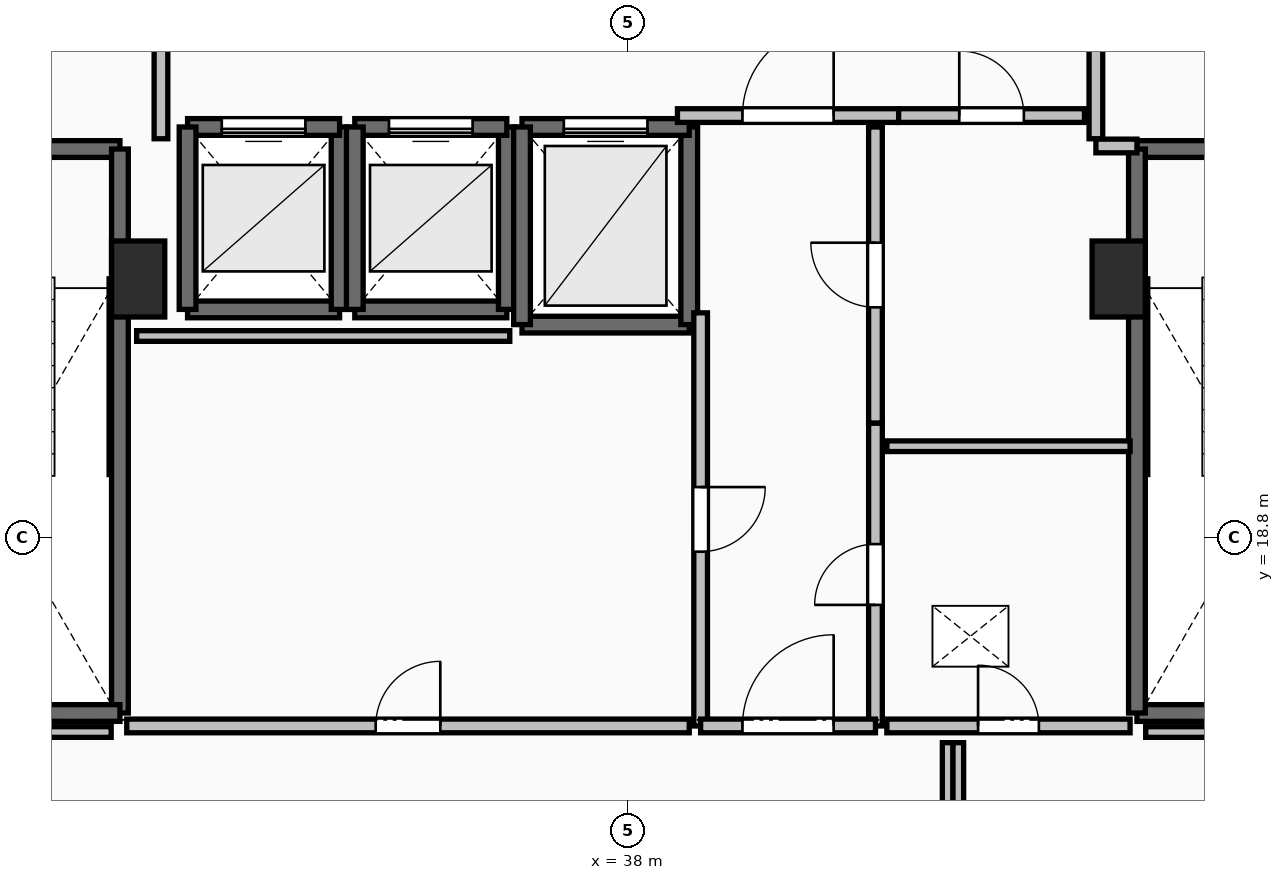
"""IFC4 building model, lengths in metres.
Left out: names, types, materials, properties, quantities, classifications, styles, units other than length and angle.
Written with IfcOpenShell. Run it as: python <this file> out.ifc"""

import sys

from ifc_helpers import new_model, si_unit, direction, frame, frame_2d, origin, origin_2d, place, context, subcontext, project, spatial, rectangle, extrude, element, fill, save


model = new_model("IFC4")
c1 = context("Model", 3, precision=1e-05, world=origin(), true_north=direction((0.0, 1.0)))
c2 = subcontext(c1, "Body", "Model", "MODEL_VIEW")
j1 = project(units=[si_unit("LENGTHUNIT", "METRE"), si_unit("PLANEANGLEUNIT", "RADIAN")], contexts=[c1])
p1 = place(None, origin())
s1 = spatial("IfcSite", under=j1, at=p1, CompositionType="ELEMENT")
p2 = place(p1, origin())
s2 = spatial("IfcBuilding", under=s1, at=p2, CompositionType="ELEMENT")
p3 = place(p2, frame((0.0, 0.0, 179.1)))
s3 = spatial("IfcBuildingStorey", under=s2, at=p3, CompositionType="ELEMENT", Elevation=179.1)
for number, where, z_axis, x_axis in (
    (1, (31.55, 22.2, 0.0), (0.0, 0.0, 1.0), (1.0, 0.0, 0.0)),
    (2, (44.45, 22.2, 0.0), (0.0, 0.0, 1.0), (1.0, 0.0, 0.0)),
):
    element("IfcColumn", number, at=place(p3, frame(where, z_axis=z_axis, x_axis=x_axis)), inside=s3, PredefinedType="PILASTER", context=c2, shape_type="SweptSolid", body=[
        extrude(rectangle(XDim=0.7, YDim=1.0, at=origin_2d()), origin(), (0.0, 0.0, 1.0), 3.5),
    ])
p4 = place(p3, frame((27.94, 23.91, 0.0), z_axis=(0.0, 0.0, 1.0), x_axis=(1.0, 0.0, 0.0)))
e3 = element("IfcWall", 3, at=p4, inside=s3, PredefinedType="SOLIDWALL", context=c2, shape_type="SweptSolid", body=[
    extrude(rectangle(XDim=3.37, YDim=0.22, at=frame_2d((1.685, 0.0))), origin(), (0.0, 0.0, 1.0), 3.24),
])
p5 = place(p4, frame((1.135, 0.0, 0.0)))
e4 = element("IfcOpeningElement", 4, at=p5, cuts=e3, PredefinedType="OPENING", context=c2, shape_type="SweptSolid", body=[
    extrude(rectangle(XDim=1.1, YDim=2.15, at=frame_2d((0.55, 1.075))), frame((0.0, 0.125, 0.0), z_axis=(0.0, -1.0, 0.0), x_axis=(1.0, 0.0, 0.0)), (0.0, 0.0, 1.0), 0.25),
])
p6 = place(p3, frame((31.31, 23.91, 0.0), z_axis=(0.0, 0.0, 1.0), x_axis=(0.0, -1.0, 0.0)))
e5 = element("IfcWall", 5, at=p6, inside=s3, PredefinedType="SOLIDWALL", context=c2, shape_type="SweptSolid", body=[
    extrude(rectangle(XDim=7.42, YDim=0.22, at=frame_2d((3.71, 0.0))), origin(), (0.0, 0.0, 1.0), 3.24),
])
p7 = place(p3, frame((31.31, 16.49, 0.0), z_axis=(0.0, 0.0, 1.0), x_axis=(-1.0, 0.0, 0.0)))
e6 = element("IfcWall", 6, at=p7, inside=s3, PredefinedType="SOLIDWALL", context=c2, shape_type="SweptSolid", body=[
    extrude(rectangle(XDim=3.37, YDim=0.22, at=frame_2d((1.685, 0.0))), origin(), (0.0, 0.0, 1.0), 3.24),
])
p8 = place(p3, frame((44.69, 23.91, 0.0), z_axis=(0.0, 0.0, 1.0), x_axis=(1.0, 0.0, 0.0)))
e7 = element("IfcWall", 7, at=p8, inside=s3, PredefinedType="SOLIDWALL", context=c2, shape_type="SweptSolid", body=[
    extrude(rectangle(XDim=3.37, YDim=0.22, at=frame_2d((1.685, 0.0))), origin(), (0.0, 0.0, 1.0), 3.24),
])
p9 = place(p8, frame((1.135, 0.0, 0.0)))
e8 = element("IfcOpeningElement", 8, at=p9, cuts=e7, PredefinedType="OPENING", context=c2, shape_type="SweptSolid", body=[
    extrude(rectangle(XDim=1.1, YDim=2.15, at=frame_2d((0.55, 1.075))), frame((0.0, 0.125, 0.0), z_axis=(0.0, -1.0, 0.0), x_axis=(1.0, 0.0, 0.0)), (0.0, 0.0, 1.0), 0.25),
])
p10 = place(p3, frame((48.06, 16.49, 0.0), z_axis=(0.0, 0.0, 1.0), x_axis=(-1.0, 0.0, 0.0)))
e9 = element("IfcWall", 9, at=p10, inside=s3, PredefinedType="SOLIDWALL", context=c2, shape_type="SweptSolid", body=[
    extrude(rectangle(XDim=3.37, YDim=0.22, at=frame_2d((1.685, 0.0))), origin(), (0.0, 0.0, 1.0), 3.24),
])
p11 = place(p3, frame((44.69, 16.49, 0.0), z_axis=(0.0, 0.0, 1.0), x_axis=(0.0, 1.0, 0.0)))
e10 = element("IfcWall", 10, at=p11, inside=s3, PredefinedType="SOLIDWALL", context=c2, shape_type="SweptSolid", body=[
    extrude(rectangle(XDim=7.42, YDim=0.22, at=frame_2d((3.71, 0.0))), origin(), (0.0, 0.0, 1.0), 3.24),
])
p12 = place(p3, frame((32.2, 21.8, 0.0), z_axis=(0.0, 0.0, 1.0), x_axis=(1.0, 0.0, 0.0)))
e11 = element("IfcWall", 11, at=p12, inside=s3, PredefinedType="SOLIDWALL", context=c2, shape_type="SweptSolid", body=[
    extrude(rectangle(XDim=2.0, YDim=0.22, at=frame_2d((1.0, 0.0))), origin(), (0.0, 0.0, 1.0), 3.24),
])
p13 = place(p3, frame((34.2, 21.8, 0.0), z_axis=(0.0, 0.0, 1.0), x_axis=(0.0, 1.0, 0.0)))
e12 = element("IfcWall", 12, at=p13, inside=s3, PredefinedType="SOLIDWALL", context=c2, shape_type="SweptSolid", body=[
    extrude(rectangle(XDim=2.4, YDim=0.22, at=frame_2d((1.2, 0.0))), origin(), (0.0, 0.0, 1.0), 3.24),
])
p14 = place(p3, frame((34.2, 24.2, 0.0), z_axis=(0.0, 0.0, 1.0), x_axis=(-1.0, 0.0, 0.0)))
e13 = element("IfcWall", 13, at=p14, inside=s3, PredefinedType="SOLIDWALL", context=c2, shape_type="SweptSolid", body=[
    extrude(rectangle(XDim=2.0, YDim=0.22, at=frame_2d((1.0, 0.0))), origin(), (0.0, 0.0, 1.0), 3.24),
])
p15 = place(p14, frame((0.45, 0.0, 0.0)))
e14 = element("IfcOpeningElement", 14, at=p15, cuts=e13, PredefinedType="OPENING", context=c2, shape_type="SweptSolid", body=[
    extrude(rectangle(XDim=1.1, YDim=2.2, at=frame_2d((0.55, 1.1))), frame((0.0, 0.125, 0.0), z_axis=(0.0, -1.0, 0.0), x_axis=(1.0, 0.0, 0.0)), (0.0, 0.0, 1.0), 0.25),
])
p16 = place(p3, frame((32.2, 24.2, 0.0), z_axis=(0.0, 0.0, 1.0), x_axis=(0.0, -1.0, 0.0)))
e15 = element("IfcWall", 15, at=p16, inside=s3, PredefinedType="SOLIDWALL", context=c2, shape_type="SweptSolid", body=[
    extrude(rectangle(XDim=2.4, YDim=0.22, at=frame_2d((1.2, 0.0))), origin(), (0.0, 0.0, 1.0), 3.24),
])
p17 = place(p3, frame((34.4, 21.8, 0.0), z_axis=(0.0, 0.0, 1.0), x_axis=(1.0, 0.0, 0.0)))
e16 = element("IfcWall", 16, at=p17, inside=s3, PredefinedType="SOLIDWALL", context=c2, shape_type="SweptSolid", body=[
    extrude(rectangle(XDim=2.0, YDim=0.22, at=frame_2d((1.0, 0.0))), origin(), (0.0, 0.0, 1.0), 3.24),
])
p18 = place(p3, frame((36.4, 21.8, 0.0), z_axis=(0.0, 0.0, 1.0), x_axis=(0.0, 1.0, 0.0)))
e17 = element("IfcWall", 17, at=p18, inside=s3, PredefinedType="SOLIDWALL", context=c2, shape_type="SweptSolid", body=[
    extrude(rectangle(XDim=2.4, YDim=0.22, at=frame_2d((1.2, 0.0))), origin(), (0.0, 0.0, 1.0), 3.24),
])
p19 = place(p3, frame((36.4, 24.2, 0.0), z_axis=(0.0, 0.0, 1.0), x_axis=(-1.0, 0.0, 0.0)))
e18 = element("IfcWall", 18, at=p19, inside=s3, PredefinedType="SOLIDWALL", context=c2, shape_type="SweptSolid", body=[
    extrude(rectangle(XDim=2.0, YDim=0.22, at=frame_2d((1.0, 0.0))), origin(), (0.0, 0.0, 1.0), 3.24),
])
p20 = place(p19, frame((0.45, 0.0, 0.0)))
e19 = element("IfcOpeningElement", 19, at=p20, cuts=e18, PredefinedType="OPENING", context=c2, shape_type="SweptSolid", body=[
    extrude(rectangle(XDim=1.1, YDim=2.2, at=frame_2d((0.55, 1.1))), frame((0.0, 0.125, 0.0), z_axis=(0.0, -1.0, 0.0), x_axis=(1.0, 0.0, 0.0)), (0.0, 0.0, 1.0), 0.25),
])
p21 = place(p3, frame((34.4, 24.2, 0.0), z_axis=(0.0, 0.0, 1.0), x_axis=(0.0, -1.0, 0.0)))
e20 = element("IfcWall", 20, at=p21, inside=s3, PredefinedType="SOLIDWALL", context=c2, shape_type="SweptSolid", body=[
    extrude(rectangle(XDim=2.4, YDim=0.22, at=frame_2d((1.2, 0.0))), origin(), (0.0, 0.0, 1.0), 3.24),
])
p22 = place(p3, frame((36.6, 21.6, 0.0), z_axis=(0.0, 0.0, 1.0), x_axis=(1.0, 0.0, 0.0)))
e21 = element("IfcWall", 21, at=p22, inside=s3, PredefinedType="SOLIDWALL", context=c2, shape_type="SweptSolid", body=[
    extrude(rectangle(XDim=2.2, YDim=0.22, at=frame_2d((1.1, 0.0))), origin(), (0.0, 0.0, 1.0), 3.24),
])
p23 = place(p3, frame((38.8, 21.6, 0.0), z_axis=(0.0, 0.0, 1.0), x_axis=(0.0, 1.0, 0.0)))
e22 = element("IfcWall", 22, at=p23, inside=s3, PredefinedType="SOLIDWALL", context=c2, shape_type="SweptSolid", body=[
    extrude(rectangle(XDim=2.6, YDim=0.22, at=frame_2d((1.3, 0.0))), origin(), (0.0, 0.0, 1.0), 3.24),
])
p24 = place(p3, frame((38.8, 24.2, 0.0), z_axis=(0.0, 0.0, 1.0), x_axis=(-1.0, 0.0, 0.0)))
e23 = element("IfcWall", 23, at=p24, inside=s3, PredefinedType="SOLIDWALL", context=c2, shape_type="SweptSolid", body=[
    extrude(rectangle(XDim=2.2, YDim=0.22, at=frame_2d((1.1, 0.0))), origin(), (0.0, 0.0, 1.0), 3.24),
])
p25 = place(p24, frame((0.55, 0.0, 0.0)))
e24 = element("IfcOpeningElement", 24, at=p25, cuts=e23, PredefinedType="OPENING", context=c2, shape_type="SweptSolid", body=[
    extrude(rectangle(XDim=1.1, YDim=2.2, at=frame_2d((0.55, 1.1))), frame((0.0, 0.125, 0.0), z_axis=(0.0, -1.0, 0.0), x_axis=(1.0, 0.0, 0.0)), (0.0, 0.0, 1.0), 0.25),
])
p26 = place(p3, frame((36.6, 24.2, 0.0), z_axis=(0.0, 0.0, 1.0), x_axis=(0.0, -1.0, 0.0)))
e25 = element("IfcWall", 25, at=p26, inside=s3, PredefinedType="SOLIDWALL", context=c2, shape_type="SweptSolid", body=[
    extrude(rectangle(XDim=2.6, YDim=0.22, at=frame_2d((1.3, 0.0))), origin(), (0.0, 0.0, 1.0), 3.24),
])
p27 = place(p3, frame((31.85, 24.045, 0.0), z_axis=(0.0, 0.0, 1.0), x_axis=(0.0, 1.0, 0.0)))
e26 = element("IfcWall", 26, at=p27, inside=s3, PredefinedType="PARTITIONING", context=c2, shape_type="SweptSolid", body=[
    extrude(rectangle(XDim=3.91, YDim=0.18, at=frame_2d((1.955, 0.0))), origin(), (0.0, 0.0, 1.0), 3.24),
])
p28 = place(p27, frame((1.355, 0.0, 0.0)))
e27 = element("IfcOpeningElement", 27, at=p28, cuts=e26, PredefinedType="OPENING", context=c2, shape_type="SweptSolid", body=[
    extrude(rectangle(XDim=1.2, YDim=2.15, at=frame_2d((0.6, 1.075))), frame((0.0, 0.105, 0.0), z_axis=(0.0, -1.0, 0.0), x_axis=(1.0, 0.0, 0.0)), (0.0, 0.0, 1.0), 0.21),
])
p29 = place(p3, frame((44.15, 27.955, 0.0), z_axis=(0.0, 0.0, 1.0), x_axis=(0.0, -1.0, 0.0)))
e28 = element("IfcWall", 28, at=p29, inside=s3, PredefinedType="PARTITIONING", context=c2, shape_type="SweptSolid", body=[
    extrude(rectangle(XDim=3.91, YDim=0.18, at=frame_2d((1.955, 0.0))), origin(), (0.0, 0.0, 1.0), 3.24),
])
p30 = place(p29, frame((1.355, 0.0, 0.0)))
e29 = element("IfcOpeningElement", 29, at=p30, cuts=e28, PredefinedType="OPENING", context=c2, shape_type="SweptSolid", body=[
    extrude(rectangle(XDim=1.2, YDim=2.15, at=frame_2d((0.6, 1.075))), frame((0.0, 0.105, 0.0), z_axis=(0.0, -1.0, 0.0), x_axis=(1.0, 0.0, 0.0)), (0.0, 0.0, 1.0), 0.21),
])
p31 = place(p3, frame((44.15, 23.95, 0.0), z_axis=(0.0, 0.0, 1.0), x_axis=(1.0, 0.0, 0.0)))
e30 = element("IfcWall", 30, at=p31, inside=s3, PredefinedType="PARTITIONING", context=c2, shape_type="SweptSolid", body=[
    extrude(rectangle(XDim=0.54, YDim=0.18, at=frame_2d((0.27, 0.0))), origin(), (0.0, 0.0, 1.0), 3.24),
])
p32 = place(p3, frame((38.645, 24.35, 0.0), z_axis=(0.0, 0.0, 1.0), x_axis=(1.0, 0.0, 0.0)))
e31 = element("IfcWall", 31, at=p32, inside=s3, PredefinedType="PARTITIONING", context=c2, shape_type="SweptSolid", body=[
    extrude(rectangle(XDim=2.91, YDim=0.18, at=frame_2d((1.455, 0.0))), origin(), (0.0, 0.0, 1.0), 3.24),
])
p33 = place(p32, frame((0.855, 0.0, 0.0)))
e32 = element("IfcOpeningElement", 32, at=p33, cuts=e31, PredefinedType="OPENING", context=c2, shape_type="SweptSolid", body=[
    extrude(rectangle(XDim=1.2, YDim=2.15, at=frame_2d((0.6, 1.075))), frame((0.0, 0.105, 0.0), z_axis=(0.0, -1.0, 0.0), x_axis=(1.0, 0.0, 0.0)), (0.0, 0.0, 1.0), 0.21),
])
p34 = place(p3, frame((41.555, 24.35, 0.0), z_axis=(0.0, 0.0, 1.0), x_axis=(1.0, 0.0, 0.0)))
e33 = element("IfcWall", 33, at=p34, inside=s3, PredefinedType="PARTITIONING", context=c2, shape_type="SweptSolid", body=[
    extrude(rectangle(XDim=2.445, YDim=0.18, at=frame_2d((1.223, 0.0))), origin(), (0.0, 0.0, 1.0), 3.24),
])
p35 = place(p34, frame((0.798, 0.0, 0.0)))
e34 = element("IfcOpeningElement", 34, at=p35, cuts=e33, PredefinedType="OPENING", context=c2, shape_type="SweptSolid", body=[
    extrude(rectangle(XDim=0.85, YDim=2.1, at=frame_2d((0.425, 1.05))), frame((0.0, 0.105, 0.0), z_axis=(0.0, -1.0, 0.0), x_axis=(1.0, 0.0, 0.0)), (0.0, 0.0, 1.0), 0.21),
])
p36 = place(p3, frame((41.25, 16.32, 0.0), z_axis=(0.0, 0.0, 1.0), x_axis=(0.0, 1.0, 0.0)))
e35 = element("IfcWall", 35, at=p36, inside=s3, PredefinedType="PARTITIONING", context=c2, shape_type="SweptSolid", body=[
    extrude(rectangle(XDim=3.985, YDim=0.18, at=frame_2d((1.992, 0.0))), origin(), (0.0, 0.0, 1.0), 3.24),
])
p37 = place(p36, frame((1.593, 0.0, 0.0)))
e36 = element("IfcOpeningElement", 36, at=p37, cuts=e35, PredefinedType="OPENING", context=c2, shape_type="SweptSolid", body=[
    extrude(rectangle(XDim=0.8, YDim=2.05, at=frame_2d((0.4, 1.025))), frame((0.0, 0.105, 0.0), z_axis=(0.0, -1.0, 0.0), x_axis=(1.0, 0.0, 0.0)), (0.0, 0.0, 1.0), 0.21),
])
p38 = place(p3, frame((41.25, 20.305, 0.0), z_axis=(0.0, 0.0, 1.0), x_axis=(0.0, 1.0, 0.0)))
e37 = element("IfcWall", 37, at=p38, inside=s3, PredefinedType="PARTITIONING", context=c2, shape_type="SweptSolid", body=[
    extrude(rectangle(XDim=3.895, YDim=0.18, at=frame_2d((1.948, 0.0))), origin(), (0.0, 0.0, 1.0), 3.24),
])
p39 = place(p38, frame((1.522, 0.0, 0.0)))
e38 = element("IfcOpeningElement", 38, at=p39, cuts=e37, PredefinedType="OPENING", context=c2, shape_type="SweptSolid", body=[
    extrude(rectangle(XDim=0.85, YDim=2.1, at=frame_2d((0.425, 1.05))), frame((0.0, 0.105, 0.0), z_axis=(0.0, -1.0, 0.0), x_axis=(1.0, 0.0, 0.0)), (0.0, 0.0, 1.0), 0.21),
])
p40 = place(p3, frame((38.95, 21.755, 0.0), z_axis=(0.0, 0.0, 1.0), x_axis=(0.0, -1.0, 0.0)))
e39 = element("IfcWall", 39, at=p40, inside=s3, PredefinedType="PARTITIONING", context=c2, shape_type="SweptSolid", body=[
    extrude(rectangle(XDim=5.435, YDim=0.18, at=frame_2d((2.717, 0.0))), origin(), (0.0, 0.0, 1.0), 3.24),
])
p41 = place(p40, frame((2.292, 0.0, 0.0)))
e40 = element("IfcOpeningElement", 40, at=p41, cuts=e39, PredefinedType="OPENING", context=c2, shape_type="SweptSolid", body=[
    extrude(rectangle(XDim=0.85, YDim=2.1, at=frame_2d((0.425, 1.05))), frame((0.0, 0.105, 0.0), z_axis=(0.0, -1.0, 0.0), x_axis=(1.0, 0.0, 0.0)), (0.0, 0.0, 1.0), 0.21),
])
p42 = place(p3, frame((38.95, 16.32, 0.0), z_axis=(0.0, 0.0, 1.0), x_axis=(1.0, 0.0, 0.0)))
e41 = element("IfcWall", 41, at=p42, inside=s3, PredefinedType="PARTITIONING", context=c2, shape_type="SweptSolid", body=[
    extrude(rectangle(XDim=2.3, YDim=0.18, at=frame_2d((1.15, 0.0))), origin(), (0.0, 0.0, 1.0), 3.24),
])
p43 = place(p42, frame((0.55, 0.0, 0.0)))
e42 = element("IfcOpeningElement", 42, at=p43, cuts=e41, PredefinedType="OPENING", context=c2, shape_type="SweptSolid", body=[
    extrude(rectangle(XDim=1.2, YDim=2.15, at=frame_2d((0.6, 1.075))), frame((0.0, 0.105, 0.0), z_axis=(0.0, -1.0, 0.0), x_axis=(1.0, 0.0, 0.0)), (0.0, 0.0, 1.0), 0.21),
])
p44 = place(p3, frame((44.6, 20.0, 0.0), z_axis=(0.0, 0.0, 1.0), x_axis=(-1.0, 0.0, 0.0)))
e43 = element("IfcWall", 43, at=p44, inside=s3, PredefinedType="PARTITIONING", context=c2, shape_type="SweptSolid", body=[
    extrude(rectangle(XDim=3.2, YDim=0.14, at=frame_2d((1.6, 0.0))), origin(), (0.0, 0.0, 1.0), 3.24),
])
p45 = place(p3, frame((41.4, 16.32, 0.0), z_axis=(0.0, 0.0, 1.0), x_axis=(1.0, 0.0, 0.0)))
e44 = element("IfcWall", 44, at=p45, inside=s3, PredefinedType="PARTITIONING", context=c2, shape_type="SweptSolid", body=[
    extrude(rectangle(XDim=3.2, YDim=0.18, at=frame_2d((1.6, 0.0))), origin(), (0.0, 0.0, 1.0), 3.24),
])
p46 = place(p45, frame((1.2, 0.0, 0.0)))
e45 = element("IfcOpeningElement", 45, at=p46, cuts=e44, PredefinedType="OPENING", context=c2, shape_type="SweptSolid", body=[
    extrude(rectangle(XDim=0.8, YDim=2.05, at=frame_2d((0.4, 1.025))), frame((0.0, 0.105, 0.0), z_axis=(0.0, -1.0, 0.0), x_axis=(1.0, 0.0, 0.0)), (0.0, 0.0, 1.0), 0.21),
])
p47 = place(p3, frame((31.4, 16.32, 0.0), z_axis=(0.0, 0.0, 1.0), x_axis=(1.0, 0.0, 0.0)))
e46 = element("IfcWall", 46, at=p47, inside=s3, PredefinedType="PARTITIONING", context=c2, shape_type="SweptSolid", body=[
    extrude(rectangle(XDim=7.4, YDim=0.18, at=frame_2d((3.7, 0.0))), origin(), (0.0, 0.0, 1.0), 3.24),
])
p48 = place(p47, frame((3.275, 0.0, 0.0)))
e47 = element("IfcOpeningElement", 47, at=p48, cuts=e46, PredefinedType="OPENING", context=c2, shape_type="SweptSolid", body=[
    extrude(rectangle(XDim=0.85, YDim=2.1, at=frame_2d((0.425, 1.05))), frame((0.0, 0.105, 0.0), z_axis=(0.0, -1.0, 0.0), x_axis=(1.0, 0.0, 0.0)), (0.0, 0.0, 1.0), 0.21),
])
p49 = place(p3, frame((36.439, 21.45, 0.0), z_axis=(0.0, 0.0, 1.0), x_axis=(-1.0, 0.0, 0.0)))
e48 = element("IfcWall", 48, at=p49, inside=s3, PredefinedType="PARTITIONING", context=c2, shape_type="SweptSolid", body=[
    extrude(rectangle(XDim=4.909, YDim=0.14, at=frame_2d((2.455, 0.0))), origin(), (0.0, 0.0, 1.0), 3.24),
])
for number, where, z_axis, x_axis in (
    (49, (44.805, 16.24, 0.0), (0.0, 0.0, 1.0), (1.0, 0.0, 0.0)),
    (50, (27.45, 16.24, 0.0), (0.0, 0.0, 1.0), (1.0, 0.0, 0.0)),
):
    element("IfcWall", number, at=place(p3, frame(where, z_axis=z_axis, x_axis=x_axis)), inside=s3, PredefinedType="PARTITIONING", context=c2, shape_type="SweptSolid", body=[
        extrude(rectangle(XDim=3.745, YDim=0.14, at=frame_2d((1.873, 0.0))), origin(), (0.0, 0.0, 1.0), 2.432),
    ])
for number, where, z_axis, x_axis in (
    (51, (42.2, 16.1, 0.0), (0.0, 0.0, 1.0), (0.0, -1.0, 0.0)),
    (52, (42.34, 14.27, 0.0), (0.0, 0.0, 1.0), (0.0, 1.0, 0.0)),
):
    element("IfcWall", number, at=place(p3, frame(where, z_axis=z_axis, x_axis=x_axis)), inside=s3, PredefinedType="PARTITIONING", context=c2, shape_type="SweptSolid", body=[
        extrude(rectangle(XDim=1.83, YDim=0.14, at=frame_2d((0.915, 0.0))), origin(), (0.0, 0.0, 1.0), 2.922),
    ])
p50 = place(p15, origin())
e53 = element("IfcDoor", 53, at=p50, inside=s3, OperationType="SLIDING_TO_LEFT", PredefinedType="DOOR", context=c2, shape_type="SweptSolid", body=[
    extrude(rectangle(XDim=1.1, YDim=2.2, at=frame_2d((0.55, 1.1))), frame((0.0, 0.025, 0.0), z_axis=(0.0, -1.0, 0.0), x_axis=(1.0, 0.0, 0.0)), (0.0, 0.0, 1.0), 0.05),
])
fill(e14, e53)
p51 = place(p20, origin())
e54 = element("IfcDoor", 54, at=p51, inside=s3, OperationType="SLIDING_TO_LEFT", PredefinedType="DOOR", context=c2, shape_type="SweptSolid", body=[
    extrude(rectangle(XDim=1.1, YDim=2.2, at=frame_2d((0.55, 1.1))), frame((0.0, 0.025, 0.0), z_axis=(0.0, -1.0, 0.0), x_axis=(1.0, 0.0, 0.0)), (0.0, 0.0, 1.0), 0.05),
])
fill(e19, e54)
p52 = place(p25, origin())
e55 = element("IfcDoor", 55, at=p52, inside=s3, OperationType="SLIDING_TO_LEFT", PredefinedType="DOOR", context=c2, shape_type="SweptSolid", body=[
    extrude(rectangle(XDim=1.1, YDim=2.2, at=frame_2d((0.55, 1.1))), frame((0.0, 0.025, 0.0), z_axis=(0.0, -1.0, 0.0), x_axis=(1.0, 0.0, 0.0)), (0.0, 0.0, 1.0), 0.05),
])
fill(e24, e55)
p53 = place(p33, origin())
e56 = element("IfcDoor", 56, at=p53, inside=s3, OperationType="SINGLE_SWING_RIGHT", PredefinedType="DOOR", context=c2, shape_type="SweptSolid", body=[
    extrude(rectangle(XDim=1.2, YDim=2.15, at=frame_2d((0.6, 1.075))), frame((0.0, 0.025, 0.0), z_axis=(0.0, -1.0, 0.0), x_axis=(1.0, 0.0, 0.0)), (0.0, 0.0, 1.0), 0.05),
])
fill(e32, e56)
p54 = place(p35, origin())
e57 = element("IfcDoor", 57, at=p54, inside=s3, OperationType="SINGLE_SWING_LEFT", PredefinedType="DOOR", context=c2, shape_type="SweptSolid", body=[
    extrude(rectangle(XDim=0.85, YDim=2.1, at=frame_2d((0.425, 1.05))), frame((0.0, 0.025, 0.0), z_axis=(0.0, -1.0, 0.0), x_axis=(1.0, 0.0, 0.0)), (0.0, 0.0, 1.0), 0.05),
])
fill(e34, e57)
p55 = place(p37, origin())
e58 = element("IfcDoor", 58, at=p55, inside=s3, OperationType="SINGLE_SWING_LEFT", PredefinedType="DOOR", context=c2, shape_type="SweptSolid", body=[
    extrude(rectangle(XDim=0.8, YDim=2.05, at=frame_2d((0.4, 1.025))), frame((0.0, 0.025, 0.0), z_axis=(0.0, -1.0, 0.0), x_axis=(1.0, 0.0, 0.0)), (0.0, 0.0, 1.0), 0.05),
])
fill(e36, e58)
p56 = place(p39, origin())
e59 = element("IfcDoor", 59, at=p56, inside=s3, OperationType="SINGLE_SWING_RIGHT", PredefinedType="DOOR", context=c2, shape_type="SweptSolid", body=[
    extrude(rectangle(XDim=0.85, YDim=2.1, at=frame_2d((0.425, 1.05))), frame((0.0, 0.025, 0.0), z_axis=(0.0, -1.0, 0.0), x_axis=(1.0, 0.0, 0.0)), (0.0, 0.0, 1.0), 0.05),
])
fill(e38, e59)
p57 = place(p41, origin())
e60 = element("IfcDoor", 60, at=p57, inside=s3, OperationType="SINGLE_SWING_LEFT", PredefinedType="DOOR", context=c2, shape_type="SweptSolid", body=[
    extrude(rectangle(XDim=0.85, YDim=2.1, at=frame_2d((0.425, 1.05))), frame((0.0, 0.025, 0.0), z_axis=(0.0, -1.0, 0.0), x_axis=(1.0, 0.0, 0.0)), (0.0, 0.0, 1.0), 0.05),
])
fill(e40, e60)
p58 = place(p43, origin())
e61 = element("IfcDoor", 61, at=p58, inside=s3, OperationType="SINGLE_SWING_RIGHT", PredefinedType="DOOR", context=c2, shape_type="SweptSolid", body=[
    extrude(rectangle(XDim=1.2, YDim=2.15, at=frame_2d((0.6, 1.075))), frame((0.0, 0.025, 0.0), z_axis=(0.0, -1.0, 0.0), x_axis=(1.0, 0.0, 0.0)), (0.0, 0.0, 1.0), 0.05),
])
fill(e42, e61)
p59 = place(p46, origin())
e62 = element("IfcDoor", 62, at=p59, inside=s3, OperationType="SINGLE_SWING_LEFT", PredefinedType="DOOR", context=c2, shape_type="SweptSolid", body=[
    extrude(rectangle(XDim=0.8, YDim=2.05, at=frame_2d((0.4, 1.025))), frame((0.0, 0.025, 0.0), z_axis=(0.0, -1.0, 0.0), x_axis=(1.0, 0.0, 0.0)), (0.0, 0.0, 1.0), 0.05),
])
fill(e45, e62)
p60 = place(p48, origin())
e63 = element("IfcDoor", 63, at=p60, inside=s3, OperationType="SINGLE_SWING_RIGHT", PredefinedType="DOOR", context=c2, shape_type="SweptSolid", body=[
    extrude(rectangle(XDim=0.85, YDim=2.1, at=frame_2d((0.425, 1.05))), frame((0.0, 0.025, 0.0), z_axis=(0.0, -1.0, 0.0), x_axis=(1.0, 0.0, 0.0)), (0.0, 0.0, 1.0), 0.05),
])
fill(e47, e63)
save(model, sys.argv[1])
